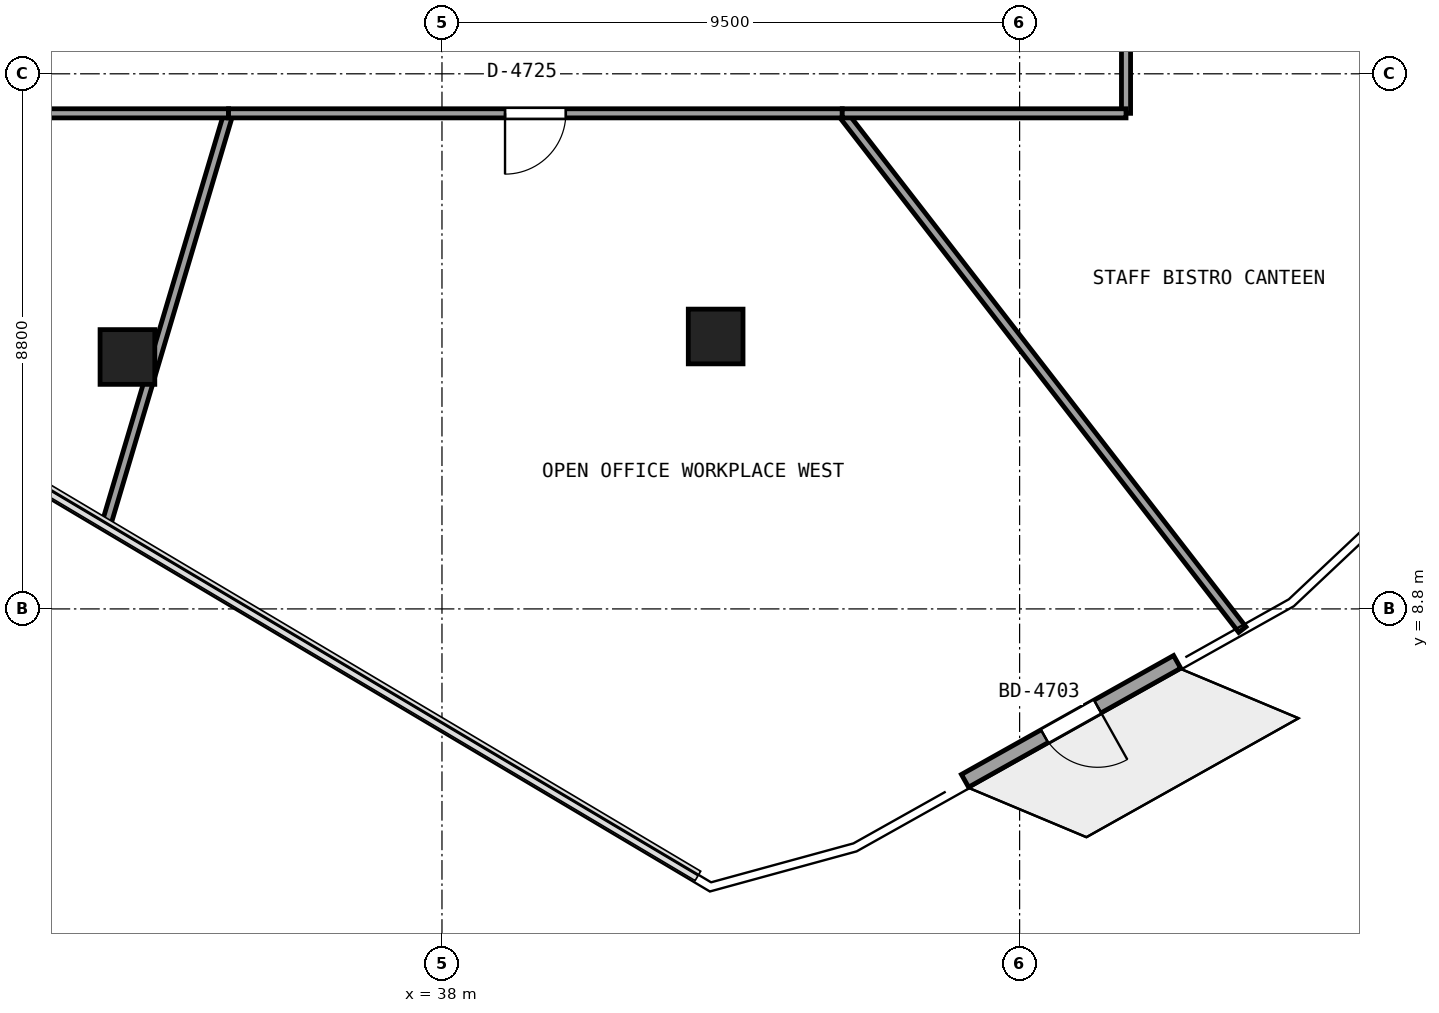
"""IFC4 building model, lengths in metres.
Left out: names, types, materials, properties, quantities, classifications, styles, units other than length and angle.
Written with IfcOpenShell. Run it as: python <this file> out.ifc"""

import sys

from ifc_helpers import new_model, si_unit, direction, frame, frame_2d, origin, origin_2d, place, context, subcontext, project, spatial, rectangle, extrude, element, fill, save


model = new_model("IFC4")
c1 = context("Model", 3, precision=1e-05, world=origin(), true_north=direction((0.0, 1.0)))
c2 = subcontext(c1, "Body", "Model", "MODEL_VIEW")
j1 = project(units=[si_unit("LENGTHUNIT", "METRE"), si_unit("PLANEANGLEUNIT", "RADIAN")], contexts=[c1])
p1 = place(None, origin())
s1 = spatial("IfcSite", under=j1, at=p1, CompositionType="ELEMENT")
p2 = place(p1, origin())
s2 = spatial("IfcBuilding", under=s1, at=p2, CompositionType="ELEMENT")
p3 = place(p2, frame((0.0, 0.0, 177.0)))
s3 = spatial("IfcBuildingStorey", under=s2, at=p3, CompositionType="ELEMENT", Elevation=177.0)
for number, where, z_axis, x_axis in (
    (1, (32.827, 12.943, -0.405), (0.0, 0.0, 1.0), (1.0, 0.0, 0.0)),
    (2, (42.501, 13.28, -0.405), (0.0, 0.0, 1.0), (1.0, 0.0, 0.0)),
):
    element("IfcColumn", number, at=place(p3, frame(where, z_axis=z_axis, x_axis=x_axis)), inside=s3, PredefinedType="COLUMN", context=c2, shape_type="SweptSolid", body=[
        extrude(rectangle(XDim=0.9, YDim=0.9, at=origin_2d()), origin(), (0.0, 0.0, 1.0), 3.725),
    ])
p4 = place(p3, frame((50.091, 7.929, 0.0), z_axis=(0.0, 0.0, 1.0), x_axis=(-0.872270690653, -0.489023355504, 0.0)))
e3 = element("IfcWall", 3, at=p4, inside=s3, PredefinedType="SOLIDWALL", context=c2, shape_type="SweptSolid", body=[
    extrude(rectangle(XDim=4.0, YDim=0.24, at=frame_2d((2.0, 0.0))), origin(), (0.0, 0.0, 1.0), 3.32),
])
p5 = place(p4, frame((1.5, 0.0, 0.0)))
e4 = element("IfcOpeningElement", 4, at=p5, cuts=e3, PredefinedType="OPENING", context=c2, shape_type="SweptSolid", body=[
    extrude(rectangle(XDim=1.0, YDim=2.15, at=frame_2d((0.5, 1.075))), frame((0.0, 0.13, 0.0), z_axis=(0.0, -1.0, 0.0), x_axis=(1.0, 0.0, 0.0)), (0.0, 0.0, 1.0), 0.26),
])
p6 = place(p3, frame((32.466, 10.15, 0.0), z_axis=(0.0, 0.0, 1.0), x_axis=(0.285266765974, 0.958448158343, 0.0)))
e5 = element("IfcWall", 5, at=p6, inside=s3, PredefinedType="PARTITIONING", context=c2, shape_type="SweptSolid", body=[
    extrude(rectangle(XDim=7.095, YDim=0.15, at=frame_2d((3.547, 0.0))), origin(), (0.0, 0.0, 1.0), 2.905),
])
p7 = place(p3, frame((34.49, 16.95, 0.0), z_axis=(0.0, 0.0, 1.0), x_axis=(-1.0, 0.0, 0.0)))
e6 = element("IfcWall", 6, at=p7, inside=s3, PredefinedType="PARTITIONING", context=c2, shape_type="SweptSolid", body=[
    extrude(rectangle(XDim=7.69, YDim=0.15, at=frame_2d((3.845, 0.0))), origin(), (0.0, 0.0, 1.0), 2.697),
])
p8 = place(p7, frame((3.345, 0.0, 0.0)))
e7 = element("IfcOpeningElement", 7, at=p8, cuts=e6, PredefinedType="OPENING", context=c2, shape_type="SweptSolid", body=[
    extrude(rectangle(XDim=1.0, YDim=2.15, at=frame_2d((0.5, 1.075))), frame((0.0, 0.085, 0.0), z_axis=(0.0, -1.0, 0.0), x_axis=(1.0, 0.0, 0.0)), (0.0, 0.0, 1.0), 0.17),
])
p9 = place(p3, frame((51.163, 8.46, 0.0), z_axis=(0.0, 0.0, 1.0), x_axis=(-0.61259119033, 0.790399919996, 0.0)))
e8 = element("IfcWall", 8, at=p9, inside=s3, PredefinedType="PARTITIONING", context=c2, shape_type="SweptSolid", body=[
    extrude(rectangle(XDim=10.741, YDim=0.15, at=frame_2d((5.371, 0.0))), origin(), (0.0, 0.0, 1.0), 2.841),
])
p10 = place(p3, frame((44.583, 16.95, 0.0), z_axis=(0.0, 0.0, 1.0), x_axis=(-1.0, 0.0, 0.0)))
e9 = element("IfcWall", 9, at=p10, inside=s3, PredefinedType="PARTITIONING", context=c2, shape_type="SweptSolid", body=[
    extrude(rectangle(XDim=10.093, YDim=0.15, at=frame_2d((5.046, 0.0))), origin(), (0.0, 0.0, 1.0), 2.697),
])
p11 = place(p10, frame((4.546, 0.0, 0.0)))
e10 = element("IfcOpeningElement", 10, at=p11, cuts=e9, PredefinedType="OPENING", context=c2, shape_type="SweptSolid", body=[
    extrude(rectangle(XDim=1.0, YDim=2.15, at=frame_2d((0.5, 1.075))), frame((0.0, 0.085, 0.0), z_axis=(0.0, -1.0, 0.0), x_axis=(1.0, 0.0, 0.0)), (0.0, 0.0, 1.0), 0.17),
])
p12 = place(p3, frame((49.25, 18.6, 0.0), z_axis=(0.0, 0.0, 1.0), x_axis=(0.0, -1.0, 0.0)))
e11 = element("IfcWall", 11, at=p12, inside=s3, PredefinedType="PARTITIONING", context=c2, shape_type="SweptSolid", body=[
    extrude(rectangle(XDim=1.65, YDim=0.15, at=frame_2d((0.825, 0.0))), origin(), (0.0, 0.0, 1.0), 3.32),
])
p13 = place(p3, frame((49.25, 16.95, 0.0), z_axis=(0.0, 0.0, 1.0), x_axis=(-1.0, 0.0, 0.0)))
e12 = element("IfcWall", 12, at=p13, inside=s3, PredefinedType="PARTITIONING", context=c2, shape_type="SweptSolid", body=[
    extrude(rectangle(XDim=4.667, YDim=0.15, at=frame_2d((2.333, 0.0))), origin(), (0.0, 0.0, 1.0), 2.841),
])
p14 = place(p5, origin())
e13 = element("IfcDoor", 13, at=p14, inside=s3, OperationType="SINGLE_SWING_LEFT", PredefinedType="DOOR", context=c2, shape_type="SweptSolid", body=[
    extrude(rectangle(XDim=1.0, YDim=2.15, at=frame_2d((0.5, 1.075))), frame((0.0, 0.025, 0.0), z_axis=(0.0, -1.0, 0.0), x_axis=(1.0, 0.0, 0.0)), (0.0, 0.0, 1.0), 0.05),
])
fill(e4, e13)
p15 = place(p11, origin())
e14 = element("IfcDoor", 14, at=p15, inside=s3, OperationType="SINGLE_SWING_RIGHT", PredefinedType="DOOR", context=c2, shape_type="SweptSolid", body=[
    extrude(rectangle(XDim=1.0, YDim=2.15, at=frame_2d((0.5, 1.075))), frame((0.0, 0.025, 0.0), z_axis=(0.0, -1.0, 0.0), x_axis=(1.0, 0.0, 0.0)), (0.0, 0.0, 1.0), 0.05),
])
fill(e10, e14)
save(model, sys.argv[1])
